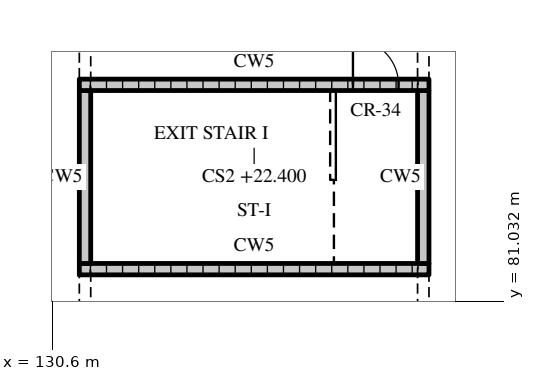
"""IFC4 building model, lengths in metres.
Left out: names, types, materials, properties, quantities, classifications, styles, units other than length and angle.
Written with IfcOpenShell. Run it as: python <this file> out.ifc"""

import sys

from ifc_helpers import new_model, si_unit, direction, frame, frame_2d, origin, place, context, subcontext, project, spatial, rectangle, extrude, element, fill, save


model = new_model("IFC4")
c1 = context("Model", 3, precision=1e-05, world=origin(), true_north=direction((0.0, 1.0)))
c2 = subcontext(c1, "Body", "Model", "MODEL_VIEW")
j1 = project(units=[si_unit("LENGTHUNIT", "METRE"), si_unit("PLANEANGLEUNIT", "RADIAN")], contexts=[c1])
p1 = place(None, origin())
s1 = spatial("IfcSite", under=j1, at=p1, CompositionType="ELEMENT")
p2 = place(p1, origin())
s2 = spatial("IfcBuilding", under=s1, at=p2, CompositionType="ELEMENT")
p3 = place(p2, frame((0.0, 0.0, 19.2)))
s3 = spatial("IfcBuildingStorey", under=s2, at=p3, CompositionType="ELEMENT", Elevation=19.2)
p4 = place(p3, frame((131.3, 81.875, 0.0), z_axis=(0.0, 0.0, 1.0), x_axis=(1.0, 0.0, 0.0)))
e1 = element("IfcWall", 1, at=p4, inside=s3, PredefinedType="SOLIDWALL", context=c2, shape_type="SweptSolid", body=[
    extrude(rectangle(XDim=9.2, YDim=0.3, at=frame_2d((4.6, 0.0))), origin(), (0.0, 0.0, 1.0), 3.0),
])
for number, where, z_axis, x_axis in (
    (2, (131.45, 82.025, 0.0), (0.0, 0.0, 1.0), (0.0, 1.0, 0.0)),
    (3, (140.35, 82.025, 0.0), (0.0, 0.0, 1.0), (0.0, 1.0, 0.0)),
):
    element("IfcWall", number, at=place(p3, frame(where, z_axis=z_axis, x_axis=x_axis)), inside=s3, PredefinedType="SOLIDWALL", context=c2, shape_type="SweptSolid", body=[
        extrude(rectangle(XDim=4.55, YDim=0.3, at=frame_2d((2.275, 0.0))), origin(), (0.0, 0.0, 1.0), 3.0),
    ])
p5 = place(p3, frame((131.3, 86.725, 0.0), z_axis=(0.0, 0.0, 1.0), x_axis=(1.0, 0.0, 0.0)))
e4 = element("IfcWall", 4, at=p5, inside=s3, PredefinedType="SOLIDWALL", context=c2, shape_type="SweptSolid", body=[
    extrude(rectangle(XDim=9.2, YDim=0.3, at=frame_2d((4.6, 0.0))), origin(), (0.0, 0.0, 1.0), 3.0),
])
p6 = place(p5, frame((7.2, 0.0, 0.0)))
e5 = element("IfcOpeningElement", 5, at=p6, cuts=e4, PredefinedType="OPENING", context=c2, shape_type="SweptSolid", body=[
    extrude(rectangle(XDim=1.2, YDim=2.1, at=frame_2d((0.6, 1.05))), frame((0.0, 0.16, 0.0), z_axis=(0.0, -1.0, 0.0), x_axis=(1.0, 0.0, 0.0)), (0.0, 0.0, 1.0), 0.32),
])
p7 = place(p6, origin())
e6 = element("IfcDoor", 6, at=p7, inside=s3, OperationType="SINGLE_SWING_LEFT", PredefinedType="DOOR", context=c2, shape_type="SweptSolid", body=[
    extrude(rectangle(XDim=1.2, YDim=2.1, at=frame_2d((0.6, 1.05))), frame((0.0, 0.025, 0.0), z_axis=(0.0, -1.0, 0.0), x_axis=(1.0, 0.0, 0.0)), (0.0, 0.0, 1.0), 0.05),
])
fill(e5, e6)
save(model, sys.argv[1])
